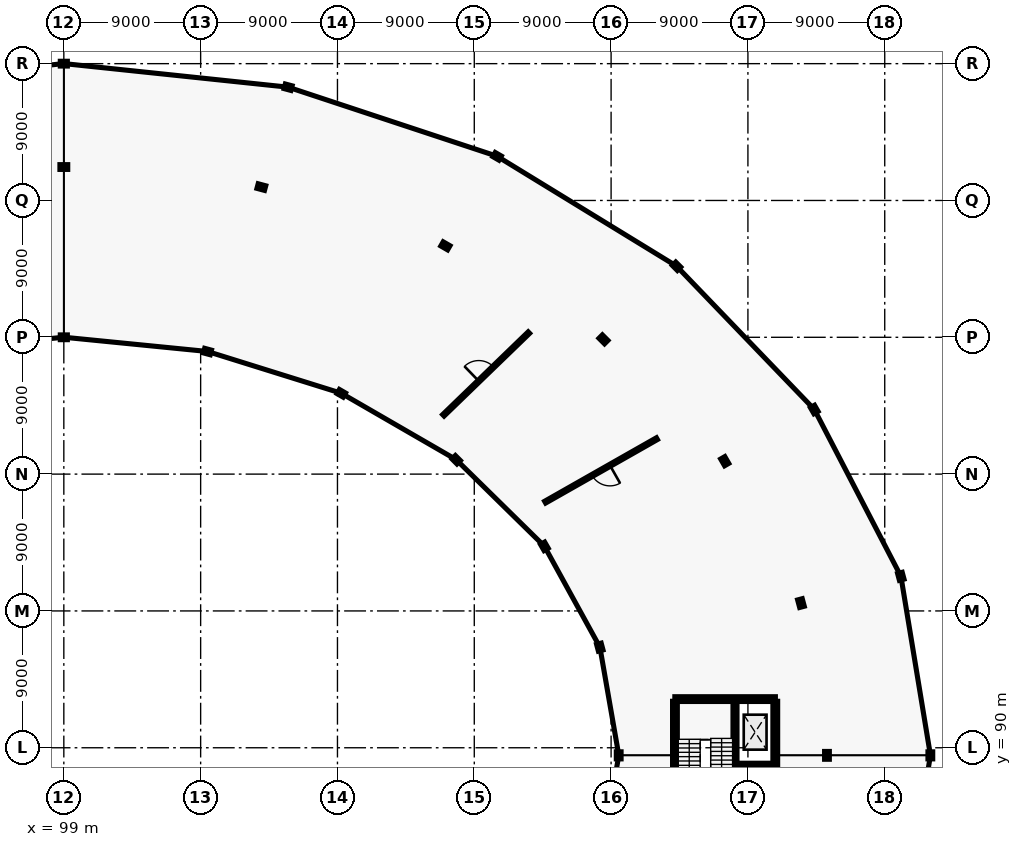
"""IFC4 building model, lengths in metres.
Left out: names, types, materials, properties, quantities, classifications, styles, units other than length and angle.
Written with IfcOpenShell. Run it as: python <this file> out.ifc"""

import sys

from ifc_helpers import new_model, si_unit, direction, frame, frame_2d, origin, origin_2d, place, context, subcontext, project, spatial, rectangle, i_section, extrude, element, fill, save


model = new_model("IFC4")
c1 = context("Model", 3, precision=1e-05, world=origin(), true_north=direction((0.0, 1.0)))
c2 = subcontext(c1, "Body", "Model", "MODEL_VIEW")
j1 = project(units=[si_unit("LENGTHUNIT", "METRE"), si_unit("PLANEANGLEUNIT", "RADIAN")], contexts=[c1])
p1 = place(None, origin())
s1 = spatial("IfcSite", under=j1, at=p1, CompositionType="ELEMENT")
p2 = place(p1, origin())
s2 = spatial("IfcBuilding", under=s1, at=p2, CompositionType="ELEMENT")
p3 = place(p2, frame((0.0, 0.0, 5.4)))
s3 = spatial("IfcBuildingStorey", under=s2, at=p3, CompositionType="ELEMENT", Elevation=5.4)
p4 = place(p3, frame((135.5, 89.5, 0.0), z_axis=(0.0, 0.0, 1.0), x_axis=(1.0, 0.0, 0.0)))
e1 = element("IfcColumn", 1, at=p4, inside=s3, PredefinedType="COLUMN", context=c2, shape_type="SweptSolid", body=[
    extrude(i_section(OverallWidth=0.3, OverallDepth=0.45, WebThickness=0.014, FlangeThickness=0.026, FilletRadius=0.027, at=origin_2d()), origin(), (0.0, 0.0, 1.0), 4.2),
])
p5 = place(p3, frame((149.2, 89.5, 0.0), z_axis=(0.0, 0.0, 1.0), x_axis=(1.0, 0.0, 0.0)))
e2 = element("IfcColumn", 2, at=p5, inside=s3, PredefinedType="COLUMN", context=c2, shape_type="SweptSolid", body=[
    extrude(i_section(OverallWidth=0.3, OverallDepth=0.5, WebThickness=0.014, FlangeThickness=0.028, FilletRadius=0.027, at=origin_2d()), origin(), (0.0, 0.0, 1.0), 4.2),
])
p6 = place(p3, frame((156.0, 89.5, 0.0), z_axis=(0.0, 0.0, 1.0), x_axis=(1.0, 0.0, 0.0)))
e3 = element("IfcColumn", 3, at=p6, inside=s3, PredefinedType="COLUMN", context=c2, shape_type="SweptSolid", body=[
    extrude(i_section(OverallWidth=0.3, OverallDepth=0.45, WebThickness=0.014, FlangeThickness=0.026, FilletRadius=0.027, at=origin_2d()), origin(), (0.0, 0.0, 1.0), 4.18),
])
p7 = place(p3, frame((134.256, 96.618, 0.0), z_axis=(0.0, 0.0, 1.0), x_axis=(0.965925826289, 0.258819045103, 0.0)))
e4 = element("IfcColumn", 4, at=p7, inside=s3, PredefinedType="COLUMN", context=c2, shape_type="SweptSolid", body=[
    extrude(i_section(OverallWidth=0.3, OverallDepth=0.45, WebThickness=0.014, FlangeThickness=0.026, FilletRadius=0.027, at=origin_2d()), origin(), (0.0, 0.0, 1.0), 4.2),
])
p8 = place(p3, frame((147.489, 99.516, 0.0), z_axis=(0.0, 0.0, 1.0), x_axis=(0.965925826289, 0.258819045103, 0.0)))
e5 = element("IfcColumn", 5, at=p8, inside=s3, PredefinedType="COLUMN", context=c2, shape_type="SweptSolid", body=[
    extrude(i_section(OverallWidth=0.3, OverallDepth=0.5, WebThickness=0.014, FlangeThickness=0.028, FilletRadius=0.027, at=origin_2d()), origin(), (0.0, 0.0, 1.0), 4.2),
])
p9 = place(p3, frame((154.058, 101.276, 0.0), z_axis=(0.0, 0.0, 1.0), x_axis=(0.965925826289, 0.258819045103, 0.0)))
e6 = element("IfcColumn", 6, at=p9, inside=s3, PredefinedType="COLUMN", context=c2, shape_type="SweptSolid", body=[
    extrude(i_section(OverallWidth=0.3, OverallDepth=0.45, WebThickness=0.014, FlangeThickness=0.026, FilletRadius=0.027, at=origin_2d()), origin(), (0.0, 0.0, 1.0), 4.18),
])
p10 = place(p3, frame((130.61, 103.25, 0.0), z_axis=(0.0, 0.0, 1.0), x_axis=(0.866025403784, 0.5, 0.0)))
e7 = element("IfcColumn", 7, at=p10, inside=s3, PredefinedType="COLUMN", context=c2, shape_type="SweptSolid", body=[
    extrude(i_section(OverallWidth=0.3, OverallDepth=0.45, WebThickness=0.014, FlangeThickness=0.026, FilletRadius=0.027, at=origin_2d()), origin(), (0.0, 0.0, 1.0), 4.2),
])
p11 = place(p3, frame((142.474, 108.85, 0.0), z_axis=(0.0, 0.0, 1.0), x_axis=(0.866025403784, 0.5, 0.0)))
e8 = element("IfcColumn", 8, at=p11, inside=s3, PredefinedType="COLUMN", context=c2, shape_type="SweptSolid", body=[
    extrude(i_section(OverallWidth=0.3, OverallDepth=0.5, WebThickness=0.014, FlangeThickness=0.028, FilletRadius=0.027, at=origin_2d()), origin(), (0.0, 0.0, 1.0), 4.2),
])
p12 = place(p3, frame((148.363, 112.25, 0.0), z_axis=(0.0, 0.0, 1.0), x_axis=(0.866025403784, 0.5, 0.0)))
e9 = element("IfcColumn", 9, at=p12, inside=s3, PredefinedType="COLUMN", context=c2, shape_type="SweptSolid", body=[
    extrude(i_section(OverallWidth=0.3, OverallDepth=0.45, WebThickness=0.014, FlangeThickness=0.026, FilletRadius=0.027, at=origin_2d()), origin(), (0.0, 0.0, 1.0), 4.18),
])
p13 = place(p3, frame((124.809, 108.945, 0.0), z_axis=(0.0, 0.0, 1.0), x_axis=(0.707106781187, 0.707106781187, 0.0)))
e10 = element("IfcColumn", 10, at=p13, inside=s3, PredefinedType="COLUMN", context=c2, shape_type="SweptSolid", body=[
    extrude(i_section(OverallWidth=0.3, OverallDepth=0.45, WebThickness=0.014, FlangeThickness=0.026, FilletRadius=0.027, at=origin_2d()), origin(), (0.0, 0.0, 1.0), 4.2),
])
p14 = place(p3, frame((134.497, 116.865, 0.0), z_axis=(0.0, 0.0, 1.0), x_axis=(0.707106781187, 0.707106781187, 0.0)))
e11 = element("IfcColumn", 11, at=p14, inside=s3, PredefinedType="COLUMN", context=c2, shape_type="SweptSolid", body=[
    extrude(i_section(OverallWidth=0.3, OverallDepth=0.5, WebThickness=0.014, FlangeThickness=0.028, FilletRadius=0.027, at=origin_2d()), origin(), (0.0, 0.0, 1.0), 4.2),
])
p15 = place(p3, frame((139.305, 121.673, 0.0), z_axis=(0.0, 0.0, 1.0), x_axis=(0.707106781187, 0.707106781187, 0.0)))
e12 = element("IfcColumn", 12, at=p15, inside=s3, PredefinedType="COLUMN", context=c2, shape_type="SweptSolid", body=[
    extrude(i_section(OverallWidth=0.3, OverallDepth=0.45, WebThickness=0.014, FlangeThickness=0.026, FilletRadius=0.027, at=origin_2d()), origin(), (0.0, 0.0, 1.0), 4.18),
])
p16 = place(p3, frame((117.25, 113.316, 0.0), z_axis=(0.0, 0.0, 1.0), x_axis=(0.5, 0.866025403784, 0.0)))
e13 = element("IfcColumn", 13, at=p16, inside=s3, PredefinedType="COLUMN", context=c2, shape_type="SweptSolid", body=[
    extrude(i_section(OverallWidth=0.3, OverallDepth=0.45, WebThickness=0.014, FlangeThickness=0.026, FilletRadius=0.027, at=origin_2d()), origin(), (0.0, 0.0, 1.0), 4.2),
])
p17 = place(p3, frame((124.1, 123.015, 0.0), z_axis=(0.0, 0.0, 1.0), x_axis=(0.5, 0.866025403784, 0.0)))
e14 = element("IfcColumn", 14, at=p17, inside=s3, PredefinedType="COLUMN", context=c2, shape_type="SweptSolid", body=[
    extrude(i_section(OverallWidth=0.3, OverallDepth=0.5, WebThickness=0.014, FlangeThickness=0.028, FilletRadius=0.027, at=origin_2d()), origin(), (0.0, 0.0, 1.0), 4.2),
])
p18 = place(p3, frame((127.5, 128.904, 0.0), z_axis=(0.0, 0.0, 1.0), x_axis=(0.5, 0.866025403784, 0.0)))
e15 = element("IfcColumn", 15, at=p18, inside=s3, PredefinedType="COLUMN", context=c2, shape_type="SweptSolid", body=[
    extrude(i_section(OverallWidth=0.3, OverallDepth=0.45, WebThickness=0.014, FlangeThickness=0.026, FilletRadius=0.027, at=origin_2d()), origin(), (0.0, 0.0, 1.0), 4.18),
])
p19 = place(p3, frame((108.447, 116.063, 0.0), z_axis=(0.0, 0.0, 1.0), x_axis=(0.258819045103, 0.965925826289, 0.0)))
e16 = element("IfcColumn", 16, at=p19, inside=s3, PredefinedType="COLUMN", context=c2, shape_type="SweptSolid", body=[
    extrude(i_section(OverallWidth=0.3, OverallDepth=0.45, WebThickness=0.014, FlangeThickness=0.026, FilletRadius=0.027, at=origin_2d()), origin(), (0.0, 0.0, 1.0), 4.2),
])
p20 = place(p3, frame((111.993, 126.881, 0.0), z_axis=(0.0, 0.0, 1.0), x_axis=(0.258819045103, 0.965925826289, 0.0)))
e17 = element("IfcColumn", 17, at=p20, inside=s3, PredefinedType="COLUMN", context=c2, shape_type="SweptSolid", body=[
    extrude(i_section(OverallWidth=0.3, OverallDepth=0.5, WebThickness=0.014, FlangeThickness=0.028, FilletRadius=0.027, at=origin_2d()), origin(), (0.0, 0.0, 1.0), 4.2),
])
p21 = place(p3, frame((113.753, 133.45, 0.0), z_axis=(0.0, 0.0, 1.0), x_axis=(0.258819045103, 0.965925826289, 0.0)))
e18 = element("IfcColumn", 18, at=p21, inside=s3, PredefinedType="COLUMN", context=c2, shape_type="SweptSolid", body=[
    extrude(i_section(OverallWidth=0.3, OverallDepth=0.45, WebThickness=0.014, FlangeThickness=0.026, FilletRadius=0.027, at=origin_2d()), origin(), (0.0, 0.0, 1.0), 4.18),
])
p22 = place(p3, frame((99.0, 117.0, 0.0), z_axis=(0.0, 0.0, 1.0), x_axis=(0.0, 1.0, 0.0)))
e19 = element("IfcColumn", 19, at=p22, inside=s3, PredefinedType="COLUMN", context=c2, shape_type="SweptSolid", body=[
    extrude(i_section(OverallWidth=0.3, OverallDepth=0.45, WebThickness=0.014, FlangeThickness=0.026, FilletRadius=0.027, at=origin_2d()), origin(), (0.0, 0.0, 1.0), 4.2),
])
p23 = place(p3, frame((99.0, 128.2, 0.0), z_axis=(0.0, 0.0, 1.0), x_axis=(0.0, 1.0, 0.0)))
e20 = element("IfcColumn", 20, at=p23, inside=s3, PredefinedType="COLUMN", context=c2, shape_type="SweptSolid", body=[
    extrude(i_section(OverallWidth=0.3, OverallDepth=0.5, WebThickness=0.014, FlangeThickness=0.028, FilletRadius=0.027, at=origin_2d()), origin(), (0.0, 0.0, 1.0), 4.2),
])
p24 = place(p3, frame((99.0, 135.0, 0.0), z_axis=(0.0, 0.0, 1.0), x_axis=(0.0, 1.0, 0.0)))
e21 = element("IfcColumn", 21, at=p24, inside=s3, PredefinedType="COLUMN", context=c2, shape_type="SweptSolid", body=[
    extrude(i_section(OverallWidth=0.3, OverallDepth=0.45, WebThickness=0.014, FlangeThickness=0.026, FilletRadius=0.027, at=origin_2d()), origin(), (0.0, 0.0, 1.0), 4.18),
])
p25 = place(p3, frame((139.2, 93.2, 0.0), z_axis=(0.0, 0.0, 1.0), x_axis=(1.0, 0.0, 0.0)))
e22 = element("IfcWall", 22, at=p25, inside=s3, PredefinedType="SHEAR", context=c2, shape_type="SweptSolid", body=[
    extrude(rectangle(XDim=6.6, YDim=0.3, at=frame_2d((3.3, 0.0))), origin(), (0.0, 0.0, 1.0), 4.2),
])
p26 = place(p3, frame((139.2, 85.95, 0.0), z_axis=(0.0, 0.0, 1.0), x_axis=(0.0, 1.0, 0.0)))
e23 = element("IfcWall", 23, at=p26, inside=s3, PredefinedType="SHEAR", context=c2, shape_type="SweptSolid", body=[
    extrude(rectangle(XDim=7.1, YDim=0.3, at=frame_2d((3.55, 0.0))), origin(), (0.0, 0.0, 1.0), 4.2),
])
p27 = place(p3, frame((145.8, 85.95, 0.0), z_axis=(0.0, 0.0, 1.0), x_axis=(0.0, 1.0, 0.0)))
e24 = element("IfcWall", 24, at=p27, inside=s3, PredefinedType="SHEAR", context=c2, shape_type="SweptSolid", body=[
    extrude(rectangle(XDim=7.1, YDim=0.3, at=frame_2d((3.55, 0.0))), origin(), (0.0, 0.0, 1.0), 4.2),
])
p28 = place(p27, frame((0.75, 0.0, 0.0)))
e25 = element("IfcOpeningElement", 25, at=p28, cuts=e24, PredefinedType="OPENING", context=c2, shape_type="SweptSolid", body=[
    extrude(rectangle(XDim=1.3, YDim=2.15, at=frame_2d((0.65, 1.075))), frame((0.0, 0.16, 0.0), z_axis=(0.0, -1.0, 0.0), x_axis=(1.0, 0.0, 0.0)), (0.0, 0.0, 1.0), 0.32),
])
p29 = place(p3, frame((143.15, 85.95, 0.0), z_axis=(0.0, 0.0, 1.0), x_axis=(0.0, 1.0, 0.0)))
e26 = element("IfcWall", 26, at=p29, inside=s3, PredefinedType="SHEAR", context=c2, shape_type="SweptSolid", body=[
    extrude(rectangle(XDim=7.1, YDim=0.25, at=frame_2d((3.55, 0.0))), origin(), (0.0, 0.0, 1.0), 4.2),
])
p30 = place(p29, frame((0.2, 0.0, 0.0)))
e27 = element("IfcOpeningElement", 27, at=p30, cuts=e26, PredefinedType="OPENING", context=c2, shape_type="SweptSolid", body=[
    extrude(rectangle(XDim=1.15, YDim=2.15, at=frame_2d((0.575, 1.075))), frame((0.0, 0.135, 0.0), z_axis=(0.0, -1.0, 0.0), x_axis=(1.0, 0.0, 0.0)), (0.0, 0.0, 1.0), 0.27),
])
p31 = place(p3, frame((143.27, 88.85, 0.0), z_axis=(0.0, 0.0, 1.0), x_axis=(1.0, 0.0, 0.0)))
e28 = element("IfcWall", 28, at=p31, inside=s3, PredefinedType="SHEAR", context=c2, shape_type="SweptSolid", body=[
    extrude(rectangle(XDim=2.38, YDim=0.25, at=frame_2d((1.19, 0.0))), origin(), (0.0, 0.0, 1.0), 4.2),
])
p32 = place(p31, frame((0.64, 0.0, 0.0)))
e29 = element("IfcOpeningElement", 29, at=p32, cuts=e28, PredefinedType="OPENING", context=c2, shape_type="SweptSolid", body=[
    extrude(rectangle(XDim=1.1, YDim=2.15, at=frame_2d((0.55, 1.075))), frame((0.0, 0.135, 0.0), z_axis=(0.0, -1.0, 0.0), x_axis=(1.0, 0.0, 0.0)), (0.0, 0.0, 1.0), 0.27),
])
p33 = place(p3, frame((130.667, 106.159, 0.0), z_axis=(0.0, 0.0, 1.0), x_axis=(0.869564093622, 0.493820095869, 0.0)))
e30 = element("IfcWall", 30, at=p33, inside=s3, PredefinedType="PARTITIONING", context=c2, shape_type="SweptSolid", body=[
    extrude(rectangle(XDim=8.442, YDim=0.12, at=frame_2d((4.221, 0.0))), origin(), (0.0, 0.0, 1.0), 3.2),
])
p34 = place(p33, frame((3.546, 0.0, 0.0)))
e31 = element("IfcOpeningElement", 31, at=p34, cuts=e30, PredefinedType="OPENING", context=c2, shape_type="SweptSolid", body=[
    extrude(rectangle(XDim=1.35, YDim=2.2, at=frame_2d((0.675, 1.1))), frame((0.0, 0.07, 0.0), z_axis=(0.0, -1.0, 0.0), x_axis=(1.0, 0.0, 0.0)), (0.0, 0.0, 1.0), 0.14),
])
p35 = place(p3, frame((123.972, 111.873, 0.0), z_axis=(0.0, 0.0, 1.0), x_axis=(0.718851460144, 0.695163706078, 0.0)))
e32 = element("IfcWall", 32, at=p35, inside=s3, PredefinedType="PARTITIONING", context=c2, shape_type="SweptSolid", body=[
    extrude(rectangle(XDim=7.812, YDim=0.12, at=frame_2d((3.906, 0.0))), origin(), (0.0, 0.0, 1.0), 3.2),
])
p36 = place(p35, frame((3.231, 0.0, 0.0)))
e33 = element("IfcOpeningElement", 33, at=p36, cuts=e32, PredefinedType="OPENING", context=c2, shape_type="SweptSolid", body=[
    extrude(rectangle(XDim=1.35, YDim=2.2, at=frame_2d((0.675, 1.1))), frame((0.0, 0.07, 0.0), z_axis=(0.0, -1.0, 0.0), x_axis=(1.0, 0.0, 0.0)), (0.0, 0.0, 1.0), 0.14),
])
p37 = place(p32, origin())
e34 = element("IfcDoor", 34, at=p37, inside=s3, OperationType="SLIDING_TO_LEFT", PredefinedType="DOOR", context=c2, shape_type="SweptSolid", body=[
    extrude(rectangle(XDim=1.1, YDim=2.15, at=frame_2d((0.55, 1.075))), frame((0.0, 0.025, 0.0), z_axis=(0.0, -1.0, 0.0), x_axis=(1.0, 0.0, 0.0)), (0.0, 0.0, 1.0), 0.05),
])
fill(e29, e34)
p38 = place(p34, origin())
e35 = element("IfcDoor", 35, at=p38, inside=s3, OperationType="SINGLE_SWING_RIGHT", PredefinedType="DOOR", context=c2, shape_type="SweptSolid", body=[
    extrude(rectangle(XDim=1.35, YDim=2.2, at=frame_2d((0.675, 1.1))), frame((0.0, 0.025, 0.0), z_axis=(0.0, -1.0, 0.0), x_axis=(1.0, 0.0, 0.0)), (0.0, 0.0, 1.0), 0.05),
])
fill(e31, e35)
p39 = place(p36, origin())
e36 = element("IfcDoor", 36, at=p39, inside=s3, OperationType="SINGLE_SWING_LEFT", PredefinedType="DOOR", context=c2, shape_type="SweptSolid", body=[
    extrude(rectangle(XDim=1.35, YDim=2.2, at=frame_2d((0.675, 1.1))), frame((0.0, 0.025, 0.0), z_axis=(0.0, -1.0, 0.0), x_axis=(1.0, 0.0, 0.0)), (0.0, 0.0, 1.0), 0.05),
])
fill(e33, e36)
save(model, sys.argv[1])
